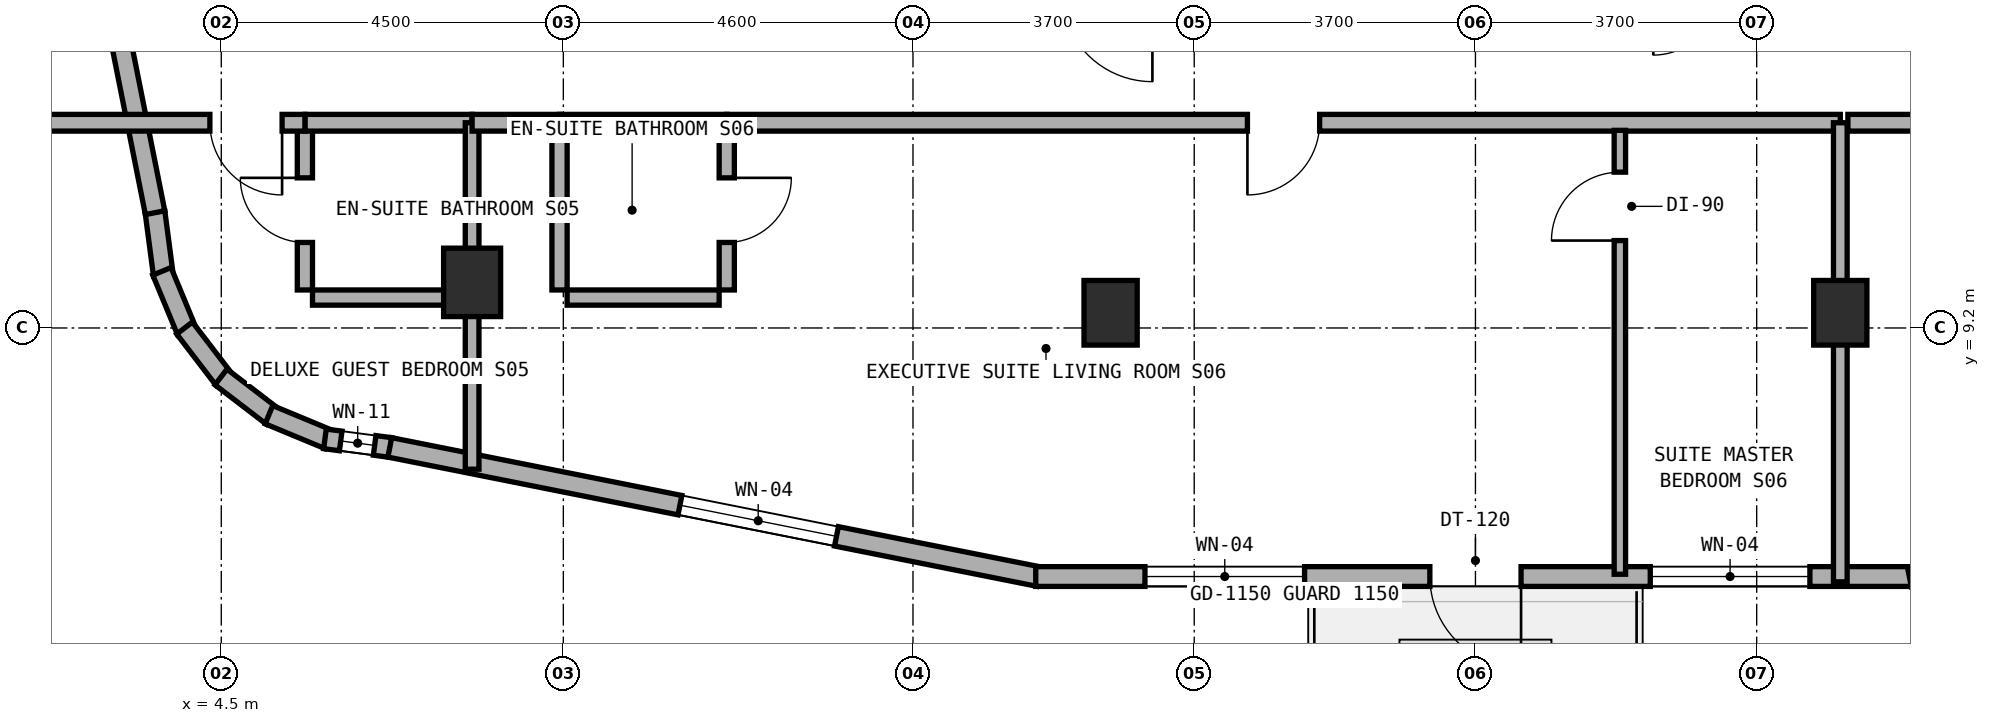
"""IFC4 building model, lengths in metres.
Left out: names, types, materials, properties, quantities, classifications, styles, units other than length and angle.
Written with IfcOpenShell. Run it as: python <this file> out.ifc"""

import sys

from ifc_helpers import new_model, si_unit, direction, frame, frame_2d, origin, origin_2d, place, context, subcontext, project, spatial, rectangle, extrude, element, fill, save


model = new_model("IFC4")
c1 = context("Model", 3, precision=1e-05, world=origin(), true_north=direction((0.0, 1.0)))
c2 = subcontext(c1, "Body", "Model", "MODEL_VIEW")
j1 = project(units=[si_unit("LENGTHUNIT", "METRE"), si_unit("PLANEANGLEUNIT", "RADIAN")], contexts=[c1])
p1 = place(None, origin())
s1 = spatial("IfcSite", under=j1, at=p1, CompositionType="ELEMENT")
p2 = place(p1, origin())
s2 = spatial("IfcBuilding", under=s1, at=p2, CompositionType="ELEMENT")
p3 = place(p2, frame((0.0, 0.0, 220.7)))
s3 = spatial("IfcBuildingStorey", under=s2, at=p3, CompositionType="ELEMENT", Elevation=220.7)
for number, where, z_axis, x_axis in (
    (1, (16.2, 9.4, 0.0), (0.0, 0.0, 1.0), (1.0, 0.0, 0.0)),
    (2, (25.8, 9.4, 0.0), (0.0, 0.0, 1.0), (1.0, 0.0, 0.0)),
):
    element("IfcColumn", number, at=place(p3, frame(where, z_axis=z_axis, x_axis=x_axis)), inside=s3, PredefinedType="COLUMN", context=c2, shape_type="SweptSolid", body=[
        extrude(rectangle(XDim=0.7, YDim=0.85, at=origin_2d()), origin(), (0.0, 0.0, 1.0), 3.6),
    ])
p4 = place(p3, frame((7.8, 9.8, 0.0), z_axis=(0.0, 0.0, 1.0), x_axis=(1.0, 0.0, 0.0)))
e3 = element("IfcColumn", 3, at=p4, inside=s3, PredefinedType="COLUMN", context=c2, shape_type="SweptSolid", body=[
    extrude(rectangle(XDim=0.75, YDim=0.9, at=origin_2d()), origin(), (0.0, 0.0, 1.0), 3.6),
])
p5 = place(p3, frame((3.628, 10.725, 0.0), z_axis=(0.0, 0.0, 1.0), x_axis=(0.130954667764, -0.9913883573, 0.0)))
e4 = element("IfcWall", 4, at=p5, inside=s3, PredefinedType="STANDARD", context=c2, shape_type="SweptSolid", body=[
    extrude(rectangle(XDim=0.833, YDim=0.26, at=frame_2d((0.417, 0.0))), origin(), (0.0, 0.0, 1.0), 3.32),
])
p6 = place(p3, frame((3.719, 9.945, 0.0), z_axis=(0.0, 0.0, 1.0), x_axis=(0.382985169477, -0.923754491172, 0.0)))
e5 = element("IfcWall", 5, at=p6, inside=s3, PredefinedType="STANDARD", context=c2, shape_type="SweptSolid", body=[
    extrude(rectangle(XDim=0.851, YDim=0.26, at=frame_2d((0.426, 0.0))), origin(), (0.0, 0.0, 1.0), 3.32),
])
for number, where, z_axis, x_axis in (
    (6, (4.017, 9.199, 0.0), (0.0, 0.0, 1.0), (0.608, -0.794, 0.0)),
    (7, (4.496, 8.555, 0.0), (0.0, 0.0, 1.0), (0.794, -0.608, 0.0)),
):
    element("IfcWall", number, at=place(p3, frame(where, z_axis=z_axis, x_axis=x_axis)), inside=s3, PredefinedType="STANDARD", context=c2, shape_type="SweptSolid", body=[
        extrude(rectangle(XDim=0.85, YDim=0.26, at=frame_2d((0.425, 0.0))), origin(), (0.0, 0.0, 1.0), 3.32),
    ])
p7 = place(p3, frame((5.127, 8.059, 0.0), z_axis=(0.0, 0.0, 1.0), x_axis=(0.923652976167, -0.383229930484, 0.0)))
e8 = element("IfcWall", 8, at=p7, inside=s3, PredefinedType="STANDARD", context=c2, shape_type="SweptSolid", body=[
    extrude(rectangle(XDim=0.851, YDim=0.26, at=frame_2d((0.426, 0.0))), origin(), (0.0, 0.0, 1.0), 3.32),
])
p8 = place(p3, frame((5.864, 7.741, 0.0), z_axis=(0.0, 0.0, 1.0), x_axis=(0.991493480548, -0.130156359936, 0.0)))
e9 = element("IfcWall", 9, at=p8, inside=s3, PredefinedType="STANDARD", context=c2, shape_type="SweptSolid", body=[
    extrude(rectangle(XDim=0.868, YDim=0.26, at=frame_2d((0.434, 0.0))), origin(), (0.0, 0.0, 1.0), 3.32),
])
p9 = place(p8, frame((0.209, 0.0, 0.85)))
e10 = element("IfcOpeningElement", 10, at=p9, cuts=e9, PredefinedType="OPENING", context=c2, shape_type="SweptSolid", body=[
    extrude(rectangle(XDim=0.45, YDim=1.5, at=frame_2d((0.225, 0.75))), frame((0.0, 0.14, 0.0), z_axis=(0.0, -1.0, 0.0), x_axis=(1.0, 0.0, 0.0)), (0.0, 0.0, 1.0), 0.28),
])
p10 = place(p3, frame((6.717, 7.629, 0.0), z_axis=(0.0, 0.0, 1.0), x_axis=(0.980748582507, -0.1952747242, 0.0)))
e11 = element("IfcWall", 11, at=p10, inside=s3, PredefinedType="STANDARD", context=c2, shape_type="SweptSolid", body=[
    extrude(rectangle(XDim=8.705, YDim=0.26, at=frame_2d((4.353, 0.0))), origin(), (0.0, 0.0, 1.0), 3.32),
])
p11 = place(p10, frame((3.892, 0.0, 0.85)))
e12 = element("IfcOpeningElement", 12, at=p11, cuts=e11, PredefinedType="OPENING", context=c2, shape_type="SweptSolid", body=[
    extrude(rectangle(XDim=2.1, YDim=1.5, at=frame_2d((1.05, 0.75))), frame((0.0, 0.14, 0.0), z_axis=(0.0, -1.0, 0.0), x_axis=(1.0, 0.0, 0.0)), (0.0, 0.0, 1.0), 0.28),
])
p12 = place(p3, frame((15.215, 5.93, 0.0), z_axis=(0.0, 0.0, 1.0), x_axis=(1.0, 0.0, 0.0)))
e13 = element("IfcWall", 13, at=p12, inside=s3, PredefinedType="STANDARD", context=c2, shape_type="SweptSolid", body=[
    extrude(rectangle(XDim=11.535, YDim=0.26, at=frame_2d((5.768, 0.0))), origin(), (0.0, 0.0, 1.0), 3.32),
])
p13 = place(p12, frame((5.185, 0.0, 0.0)))
e14 = element("IfcOpeningElement", 14, at=p13, cuts=e13, PredefinedType="OPENING", context=c2, shape_type="SweptSolid", body=[
    extrude(rectangle(XDim=1.2, YDim=2.15, at=frame_2d((0.6, 1.075))), frame((0.0, 0.14, 0.0), z_axis=(0.0, -1.0, 0.0), x_axis=(1.0, 0.0, 0.0)), (0.0, 0.0, 1.0), 0.28),
])
p14 = place(p12, frame((1.437, 0.0, 0.85)))
e15 = element("IfcOpeningElement", 15, at=p14, cuts=e13, PredefinedType="OPENING", context=c2, shape_type="SweptSolid", body=[
    extrude(rectangle(XDim=2.1, YDim=1.5, at=frame_2d((1.05, 0.75))), frame((0.0, 0.14, 0.0), z_axis=(0.0, -1.0, 0.0), x_axis=(1.0, 0.0, 0.0)), (0.0, 0.0, 1.0), 0.28),
])
p15 = place(p12, frame((8.085, 0.0, 0.85)))
e16 = element("IfcOpeningElement", 16, at=p15, cuts=e13, PredefinedType="OPENING", context=c2, shape_type="SweptSolid", body=[
    extrude(rectangle(XDim=2.1, YDim=1.5, at=frame_2d((1.05, 0.75))), frame((0.0, 0.14, 0.0), z_axis=(0.0, -1.0, 0.0), x_axis=(1.0, 0.0, 0.0)), (0.0, 0.0, 1.0), 0.28),
])
p16 = place(p3, frame((26.71, 5.922, 0.0), z_axis=(0.0, 0.0, 1.0), x_axis=(0.980752174324, 0.195256683773, 0.0)))
e17 = element("IfcWall", 17, at=p16, inside=s3, PredefinedType="STANDARD", context=c2, shape_type="SweptSolid", body=[
    extrude(rectangle(XDim=8.741, YDim=0.26, at=frame_2d((4.371, 0.0))), origin(), (0.0, 0.0, 1.0), 3.32),
])
p17 = place(p16, frame((3.321, 0.0, 0.85)))
e18 = element("IfcOpeningElement", 18, at=p17, cuts=e17, PredefinedType="OPENING", context=c2, shape_type="SweptSolid", body=[
    extrude(rectangle(XDim=2.1, YDim=1.5, at=frame_2d((1.05, 0.75))), frame((0.0, 0.14, 0.0), z_axis=(0.0, -1.0, 0.0), x_axis=(1.0, 0.0, 0.0)), (0.0, 0.0, 1.0), 0.28),
])
p18 = place(p3, frame((1.916, 19.319, 0.0), z_axis=(0.0, 0.0, 1.0), x_axis=(0.195291715883, -0.980745199176, 0.0)))
e19 = element("IfcWall", 19, at=p18, inside=s3, PredefinedType="STANDARD", context=c2, shape_type="SweptSolid", body=[
    extrude(rectangle(XDim=8.771, YDim=0.26, at=frame_2d((4.385, 0.0))), origin(), (0.0, 0.0, 1.0), 3.32),
])
p19 = place(p18, frame((2.67, 0.0, 0.85)))
e20 = element("IfcOpeningElement", 20, at=p19, cuts=e19, PredefinedType="OPENING", context=c2, shape_type="SweptSolid", body=[
    extrude(rectangle(XDim=2.1, YDim=1.5, at=frame_2d((1.05, 0.75))), frame((0.0, 0.14, 0.0), z_axis=(0.0, -1.0, 0.0), x_axis=(1.0, 0.0, 0.0)), (0.0, 0.0, 1.0), 0.28),
])
p20 = place(p3, frame((5.6, 9.7, 0.0), z_axis=(0.0, 0.0, 1.0), x_axis=(0.0, 1.0, 0.0)))
e21 = element("IfcWall", 21, at=p20, inside=s3, PredefinedType="PLUMBINGWALL", context=c2, shape_type="SweptSolid", body=[
    extrude(rectangle(XDim=2.1, YDim=0.2, at=frame_2d((1.05, 0.0))), origin(), (0.0, 0.0, 1.0), 3.32),
])
p21 = place(p20, frame((0.625, 0.0, 0.0)))
e22 = element("IfcOpeningElement", 22, at=p21, cuts=e21, PredefinedType="OPENING", context=c2, shape_type="SweptSolid", body=[
    extrude(rectangle(XDim=0.85, YDim=2.1, at=frame_2d((0.425, 1.05))), frame((0.0, 0.11, 0.0), z_axis=(0.0, -1.0, 0.0), x_axis=(1.0, 0.0, 0.0)), (0.0, 0.0, 1.0), 0.22),
])
p22 = place(p3, frame((5.7, 9.6, 0.0), z_axis=(0.0, 0.0, 1.0), x_axis=(1.0, 0.0, 0.0)))
e23 = element("IfcWall", 23, at=p22, inside=s3, PredefinedType="PLUMBINGWALL", context=c2, shape_type="SweptSolid", body=[
    extrude(rectangle(XDim=2.0, YDim=0.2, at=frame_2d((1.0, 0.0))), origin(), (0.0, 0.0, 1.0), 3.32),
])
p23 = place(p3, frame((5.6, 11.9, 0.0), z_axis=(0.0, 0.0, 1.0), x_axis=(1.0, 0.0, 0.0)))
e24 = element("IfcWall", 24, at=p23, inside=s3, PredefinedType="SOLIDWALL", context=c2, shape_type="SweptSolid", body=[
    extrude(rectangle(XDim=2.2, YDim=0.22, at=frame_2d((1.1, 0.0))), origin(), (0.0, 0.0, 1.0), 2.695),
])
p24 = place(p3, frame((1.96, 11.9, 0.0), z_axis=(0.0, 0.0, 1.0), x_axis=(1.0, 0.0, 0.0)))
e25 = element("IfcWall", 25, at=p24, inside=s3, PredefinedType="SOLIDWALL", context=c2, shape_type="SweptSolid", body=[
    extrude(rectangle(XDim=3.64, YDim=0.22, at=frame_2d((1.82, 0.0))), origin(), (0.0, 0.0, 1.0), 3.32),
])
p25 = place(p24, frame((2.39, 0.0, 0.0)))
e26 = element("IfcOpeningElement", 26, at=p25, cuts=e25, PredefinedType="OPENING", context=c2, shape_type="SweptSolid", body=[
    extrude(rectangle(XDim=0.95, YDim=2.1, at=frame_2d((0.475, 1.05))), frame((0.0, 0.12, 0.0), z_axis=(0.0, -1.0, 0.0), x_axis=(1.0, 0.0, 0.0)), (0.0, 0.0, 1.0), 0.24),
])
p26 = place(p3, frame((7.8, 7.342, 0.0), z_axis=(0.0, 0.0, 1.0), x_axis=(0.0, 1.0, 0.0)))
e27 = element("IfcWall", 27, at=p26, inside=s3, PredefinedType="SOLIDWALL", context=c2, shape_type="SweptSolid", body=[
    extrude(rectangle(XDim=4.558, YDim=0.18, at=frame_2d((2.279, 0.0))), origin(), (0.0, 0.0, 1.0), 2.695),
])
p27 = place(p3, frame((11.15, 9.7, 0.0), z_axis=(0.0, 0.0, 1.0), x_axis=(0.0, 1.0, 0.0)))
e28 = element("IfcWall", 28, at=p27, inside=s3, PredefinedType="PLUMBINGWALL", context=c2, shape_type="SweptSolid", body=[
    extrude(rectangle(XDim=2.1, YDim=0.2, at=frame_2d((1.05, 0.0))), origin(), (0.0, 0.0, 1.0), 3.015),
])
p28 = place(p27, frame((0.625, 0.0, 0.0)))
e29 = element("IfcOpeningElement", 29, at=p28, cuts=e28, PredefinedType="OPENING", context=c2, shape_type="SweptSolid", body=[
    extrude(rectangle(XDim=0.85, YDim=2.1, at=frame_2d((0.425, 1.05))), frame((0.0, 0.11, 0.0), z_axis=(0.0, -1.0, 0.0), x_axis=(1.0, 0.0, 0.0)), (0.0, 0.0, 1.0), 0.22),
])
p29 = place(p3, frame((9.05, 9.6, 0.0), z_axis=(0.0, 0.0, 1.0), x_axis=(1.0, 0.0, 0.0)))
e30 = element("IfcWall", 30, at=p29, inside=s3, PredefinedType="PLUMBINGWALL", context=c2, shape_type="SweptSolid", body=[
    extrude(rectangle(XDim=2.0, YDim=0.2, at=frame_2d((1.0, 0.0))), origin(), (0.0, 0.0, 1.0), 3.015),
])
p30 = place(p3, frame((8.95, 9.7, 0.0), z_axis=(0.0, 0.0, 1.0), x_axis=(0.0, 1.0, 0.0)))
e31 = element("IfcWall", 31, at=p30, inside=s3, PredefinedType="PLUMBINGWALL", context=c2, shape_type="SweptSolid", body=[
    extrude(rectangle(XDim=2.1, YDim=0.2, at=frame_2d((1.05, 0.0))), origin(), (0.0, 0.0, 1.0), 3.015),
])
p31 = place(p3, frame((7.8, 11.9, 0.0), z_axis=(0.0, 0.0, 1.0), x_axis=(1.0, 0.0, 0.0)))
e32 = element("IfcWall", 32, at=p31, inside=s3, PredefinedType="SOLIDWALL", context=c2, shape_type="SweptSolid", body=[
    extrude(rectangle(XDim=1.15, YDim=0.22, at=frame_2d((0.575, 0.0))), origin(), (0.0, 0.0, 1.0), 2.695),
])
p32 = place(p3, frame((8.95, 11.9, 0.0), z_axis=(0.0, 0.0, 1.0), x_axis=(1.0, 0.0, 0.0)))
e33 = element("IfcWall", 33, at=p32, inside=s3, PredefinedType="SOLIDWALL", context=c2, shape_type="SweptSolid", body=[
    extrude(rectangle(XDim=2.2, YDim=0.22, at=frame_2d((1.1, 0.0))), origin(), (0.0, 0.0, 1.0), 3.32),
])
p33 = place(p3, frame((11.15, 11.9, 0.0), z_axis=(0.0, 0.0, 1.0), x_axis=(1.0, 0.0, 0.0)))
e34 = element("IfcWall", 34, at=p33, inside=s3, PredefinedType="SOLIDWALL", context=c2, shape_type="SweptSolid", body=[
    extrude(rectangle(XDim=14.65, YDim=0.22, at=frame_2d((7.325, 0.0))), origin(), (0.0, 0.0, 1.0), 2.695),
])
p34 = place(p33, frame((6.85, 0.0, 0.0)))
e35 = element("IfcOpeningElement", 35, at=p34, cuts=e34, PredefinedType="OPENING", context=c2, shape_type="SweptSolid", body=[
    extrude(rectangle(XDim=0.95, YDim=2.1, at=frame_2d((0.475, 1.05))), frame((0.0, 0.12, 0.0), z_axis=(0.0, -1.0, 0.0), x_axis=(1.0, 0.0, 0.0)), (0.0, 0.0, 1.0), 0.24),
])
p35 = place(p3, frame((22.9, 5.96, 0.0), z_axis=(0.0, 0.0, 1.0), x_axis=(0.0, 1.0, 0.0)))
e36 = element("IfcWall", 36, at=p35, inside=s3, PredefinedType="PARTITIONING", context=c2, shape_type="SweptSolid", body=[
    extrude(rectangle(XDim=5.84, YDim=0.15, at=frame_2d((2.92, 0.0))), origin(), (0.0, 0.0, 1.0), 3.015),
])
p36 = place(p35, frame((4.39, 0.0, 0.0)))
e37 = element("IfcOpeningElement", 37, at=p36, cuts=e36, PredefinedType="OPENING", context=c2, shape_type="SweptSolid", body=[
    extrude(rectangle(XDim=0.9, YDim=2.1, at=frame_2d((0.45, 1.05))), frame((0.0, 0.085, 0.0), z_axis=(0.0, -1.0, 0.0), x_axis=(1.0, 0.0, 0.0)), (0.0, 0.0, 1.0), 0.17),
])
p37 = place(p3, frame((25.8, 5.86, 0.0), z_axis=(0.0, 0.0, 1.0), x_axis=(0.0, 1.0, 0.0)))
e38 = element("IfcWall", 38, at=p37, inside=s3, PredefinedType="SOLIDWALL", context=c2, shape_type="SweptSolid", body=[
    extrude(rectangle(XDim=6.04, YDim=0.18, at=frame_2d((3.02, 0.0))), origin(), (0.0, 0.0, 1.0), 2.695),
])
p38 = place(p3, frame((25.9, 11.9, 0.0), z_axis=(0.0, 0.0, 1.0), x_axis=(1.0, 0.0, 0.0)))
e39 = element("IfcWall", 39, at=p38, inside=s3, PredefinedType="SOLIDWALL", context=c2, shape_type="SweptSolid", body=[
    extrude(rectangle(XDim=14.04, YDim=0.22, at=frame_2d((7.02, 0.0))), origin(), (0.0, 0.0, 1.0), 2.695),
])
p39 = place(p38, frame((5.881, 0.0, 0.0)))
e40 = element("IfcOpeningElement", 40, at=p39, cuts=e39, PredefinedType="OPENING", context=c2, shape_type="SweptSolid", body=[
    extrude(rectangle(XDim=0.95, YDim=2.1, at=frame_2d((0.475, 1.05))), frame((0.0, 0.12, 0.0), z_axis=(0.0, -1.0, 0.0), x_axis=(1.0, 0.0, 0.0)), (0.0, 0.0, 1.0), 0.24),
])
p40 = place(p11, origin())
e41 = element("IfcWindow", 41, at=p40, inside=s3, PartitioningType="SINGLE_PANEL", PredefinedType="WINDOW", context=c2, shape_type="SweptSolid", body=[
    extrude(rectangle(XDim=2.1, YDim=1.5, at=frame_2d((1.05, 0.75))), frame((0.0, 0.03, 0.0), z_axis=(0.0, -1.0, 0.0), x_axis=(1.0, 0.0, 0.0)), (0.0, 0.0, 1.0), 0.06),
])
fill(e12, e41)
p41 = place(p13, frame((1.2, 0.0, 0.0), z_axis=(0.0, 0.0, 1.0), x_axis=(-1.0, 0.0, 0.0)))
e42 = element("IfcDoor", 42, at=p41, inside=s3, OperationType="SINGLE_SWING_LEFT", PredefinedType="DOOR", context=c2, shape_type="SweptSolid", body=[
    extrude(rectangle(XDim=1.2, YDim=2.15, at=frame_2d((0.6, 1.075))), frame((0.0, 0.025, 0.0), z_axis=(0.0, -1.0, 0.0), x_axis=(1.0, 0.0, 0.0)), (0.0, 0.0, 1.0), 0.05),
])
fill(e14, e42)
p42 = place(p14, origin())
e43 = element("IfcWindow", 43, at=p42, inside=s3, PartitioningType="SINGLE_PANEL", PredefinedType="WINDOW", context=c2, shape_type="SweptSolid", body=[
    extrude(rectangle(XDim=2.1, YDim=1.5, at=frame_2d((1.05, 0.75))), frame((0.0, 0.03, 0.0), z_axis=(0.0, -1.0, 0.0), x_axis=(1.0, 0.0, 0.0)), (0.0, 0.0, 1.0), 0.06),
])
fill(e15, e43)
p43 = place(p15, origin())
e44 = element("IfcWindow", 44, at=p43, inside=s3, PartitioningType="SINGLE_PANEL", PredefinedType="WINDOW", context=c2, shape_type="SweptSolid", body=[
    extrude(rectangle(XDim=2.1, YDim=1.5, at=frame_2d((1.05, 0.75))), frame((0.0, 0.03, 0.0), z_axis=(0.0, -1.0, 0.0), x_axis=(1.0, 0.0, 0.0)), (0.0, 0.0, 1.0), 0.06),
])
fill(e16, e44)
p44 = place(p9, origin())
e45 = element("IfcWindow", 45, at=p44, inside=s3, PartitioningType="SINGLE_PANEL", PredefinedType="WINDOW", context=c2, shape_type="SweptSolid", body=[
    extrude(rectangle(XDim=0.45, YDim=1.5, at=frame_2d((0.225, 0.75))), frame((0.0, 0.03, 0.0), z_axis=(0.0, -1.0, 0.0), x_axis=(1.0, 0.0, 0.0)), (0.0, 0.0, 1.0), 0.06),
])
fill(e10, e45)
p45 = place(p21, origin())
e46 = element("IfcDoor", 46, at=p45, inside=s3, OperationType="SINGLE_SWING_RIGHT", PredefinedType="DOOR", context=c2, shape_type="SweptSolid", body=[
    extrude(rectangle(XDim=0.85, YDim=2.1, at=frame_2d((0.425, 1.05))), frame((0.0, 0.025, 0.0), z_axis=(0.0, -1.0, 0.0), x_axis=(1.0, 0.0, 0.0)), (0.0, 0.0, 1.0), 0.05),
])
fill(e22, e46)
p46 = place(p25, frame((0.95, 0.0, 0.0), z_axis=(0.0, 0.0, 1.0), x_axis=(-1.0, 0.0, 0.0)))
e47 = element("IfcDoor", 47, at=p46, inside=s3, OperationType="SINGLE_SWING_LEFT", PredefinedType="DOOR", context=c2, shape_type="SweptSolid", body=[
    extrude(rectangle(XDim=0.95, YDim=2.1, at=frame_2d((0.475, 1.05))), frame((0.0, 0.025, 0.0), z_axis=(0.0, -1.0, 0.0), x_axis=(1.0, 0.0, 0.0)), (0.0, 0.0, 1.0), 0.05),
])
fill(e26, e47)
p47 = place(p28, frame((0.85, 0.0, 0.0), z_axis=(0.0, 0.0, 1.0), x_axis=(-1.0, 0.0, 0.0)))
e48 = element("IfcDoor", 48, at=p47, inside=s3, OperationType="SINGLE_SWING_LEFT", PredefinedType="DOOR", context=c2, shape_type="SweptSolid", body=[
    extrude(rectangle(XDim=0.85, YDim=2.1, at=frame_2d((0.425, 1.05))), frame((0.0, 0.025, 0.0), z_axis=(0.0, -1.0, 0.0), x_axis=(1.0, 0.0, 0.0)), (0.0, 0.0, 1.0), 0.05),
])
fill(e29, e48)
p48 = place(p34, frame((0.95, 0.0, 0.0), z_axis=(0.0, 0.0, 1.0), x_axis=(-1.0, 0.0, 0.0)))
e49 = element("IfcDoor", 49, at=p48, inside=s3, OperationType="SINGLE_SWING_RIGHT", PredefinedType="DOOR", context=c2, shape_type="SweptSolid", body=[
    extrude(rectangle(XDim=0.95, YDim=2.1, at=frame_2d((0.475, 1.05))), frame((0.0, 0.025, 0.0), z_axis=(0.0, -1.0, 0.0), x_axis=(1.0, 0.0, 0.0)), (0.0, 0.0, 1.0), 0.05),
])
fill(e35, e49)
p49 = place(p36, origin())
e50 = element("IfcDoor", 50, at=p49, inside=s3, OperationType="SINGLE_SWING_LEFT", PredefinedType="DOOR", context=c2, shape_type="SweptSolid", body=[
    extrude(rectangle(XDim=0.9, YDim=2.1, at=frame_2d((0.45, 1.05))), frame((0.0, 0.025, 0.0), z_axis=(0.0, -1.0, 0.0), x_axis=(1.0, 0.0, 0.0)), (0.0, 0.0, 1.0), 0.05),
])
fill(e37, e50)
save(model, sys.argv[1])
